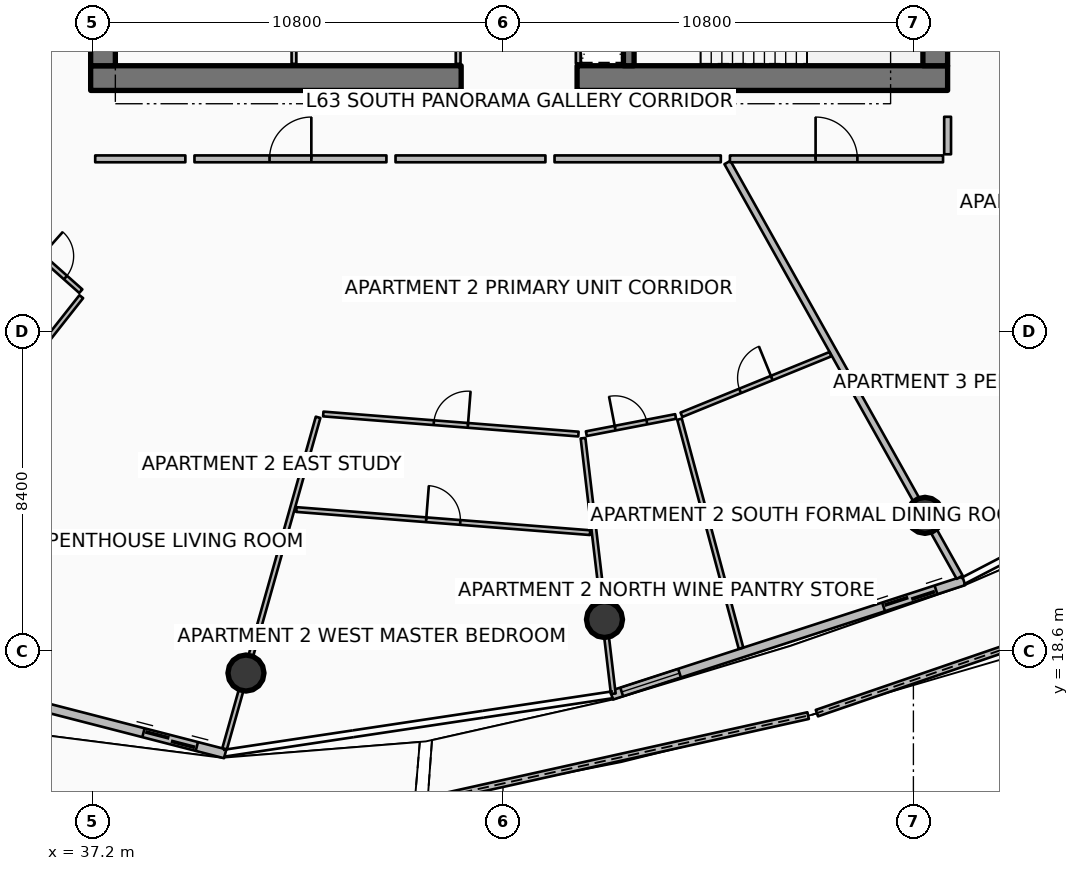
"""IFC4 building model, lengths in metres.
Left out: names, types, materials, properties, quantities, classifications, styles, units other than length and angle.
Written with IfcOpenShell. Run it as: python <this file> out.ifc"""

import sys

from ifc_helpers import new_model, si_unit, direction, frame, frame_2d, origin, origin_2d, place, context, subcontext, project, spatial, polyline, rectangle, circle, outline, extrude, element, fill, save


model = new_model("IFC4")
c1 = context("Model", 3, precision=1e-05, world=origin(), true_north=direction((0.0, 1.0)))
c2 = subcontext(c1, "Body", "Model", "MODEL_VIEW")
j1 = project(units=[si_unit("LENGTHUNIT", "METRE"), si_unit("PLANEANGLEUNIT", "RADIAN")], contexts=[c1])
p1 = place(None, origin())
s1 = spatial("IfcSite", under=j1, at=p1, CompositionType="ELEMENT")
p2 = place(p1, origin())
s2 = spatial("IfcBuilding", under=s1, at=p2, CompositionType="ELEMENT")
p3 = place(p2, frame((0.0, 0.0, 252.1)))
s3 = spatial("IfcBuildingStorey", under=s2, at=p3, CompositionType="ELEMENT", Elevation=252.1)
for number, where, z_axis, x_axis in (
    (1, (37.15, 33.675, 0.0), (0.0, 0.0, 1.0), (1.0, 0.0, 0.0)),
    (2, (49.95, 33.675, 0.0), (0.0, 0.0, 1.0), (1.0, 0.0, 0.0)),
):
    element("IfcWall", number, at=place(p3, frame(where, z_axis=z_axis, x_axis=x_axis)), inside=s3, PredefinedType="SHEAR", context=c2, shape_type="SweptSolid", body=[
        extrude(rectangle(XDim=9.75, YDim=0.65, at=frame_2d((4.875, 0.0))), origin(), (0.0, 0.0, 1.0), 3.85),
    ])
for number, where, z_axis, x_axis in (
    (3, (37.475, 34.0, 0.0), (0.0, 0.0, 1.0), (0.0, 1.0, 0.0)),
    (4, (59.375, 34.0, 0.0), (0.0, 0.0, 1.0), (0.0, 1.0, 0.0)),
):
    element("IfcWall", number, at=place(p3, frame(where, z_axis=z_axis, x_axis=x_axis)), inside=s3, PredefinedType="SHEAR", context=c2, shape_type="SweptSolid", body=[
        extrude(rectangle(XDim=16.0, YDim=0.65, at=frame_2d((8.0, 0.0))), origin(), (0.0, 0.0, 1.0), 3.85),
    ])
p4 = place(p3, frame((51.31, 34.0, 0.0), z_axis=(0.0, 0.0, 1.0), x_axis=(0.0, 1.0, 0.0)))
e5 = element("IfcWall", 5, at=p4, inside=s3, PredefinedType="SHEAR", context=c2, shape_type="SweptSolid", body=[
    extrude(rectangle(XDim=3.5, YDim=0.28, at=frame_2d((1.75, 0.0))), origin(), (0.0, 0.0, 1.0), 3.85),
])
for number, where, z_axis, x_axis in (
    (6, (41.237, 18.021, 0.0), (0.0, 0.0, 1.0), (1.0, 0.0, 0.0)),
    (7, (50.671, 19.429, 0.0), (0.0, 0.0, 1.0), (1.0, 0.0, 0.0)),
    (8, (59.105, 22.17, 0.0), (0.0, 0.0, 1.0), (1.0, 0.0, 0.0)),
):
    element("IfcColumn", number, at=place(p3, frame(where, z_axis=z_axis, x_axis=x_axis)), inside=s3, PredefinedType="COLUMN", context=c2, shape_type="SweptSolid", body=[
        extrude(circle(Radius=0.475, at=origin_2d()), origin(), (0.0, 0.0, 1.0), 3.59),
    ])
p5 = place(p3, frame((46.017, 14.673, 0.0), z_axis=(0.0, 0.0, 1.0), x_axis=(0.976130464401, 0.217184982143, 0.0)))
e9 = element("IfcWall", 9, at=p5, inside=s3, PredefinedType="PARAPET", context=c2, shape_type="SweptSolid", body=[
    extrude(outline(polyline([(0.0, 0.0), (10.258, 0.0), (10.257, 1.348), (5.129, 1.182), (0.0, 1.12), (0.0, 0.0)])), frame((0.0, 0.09, 0.0), z_axis=(0.0, -1.0, 0.0), x_axis=(1.0, 0.0, 0.0)), (0.0, 0.0, 1.0), 0.18),
])
p6 = place(p3, frame((56.26, 16.966, 0.0), z_axis=(0.0, 0.0, 1.0), x_axis=(0.945994037051, 0.32418402469, 0.0)))
e10 = element("IfcWall", 10, at=p6, inside=s3, PredefinedType="PARAPET", context=c2, shape_type="SweptSolid", body=[
    extrude(outline(polyline([(0.0, 0.0), (10.544, 0.0), (10.544, 1.747), (5.272, 1.562), (0.0, 1.348), (0.0, 0.0)])), frame((0.0, 0.09, 0.0), z_axis=(0.0, -1.0, 0.0), x_axis=(1.0, 0.0, 0.0)), (0.0, 0.0, 1.0), 0.18),
])
p7 = place(p3, frame((29.614, 18.751, 0.0), z_axis=(0.0, 0.0, 1.0), x_axis=(0.968343758421, -0.249620442927, 0.0)))
e11 = element("IfcWall", 11, at=p7, inside=s3, PredefinedType="SOLIDWALL", context=c2, shape_type="SweptSolid", body=[
    extrude(rectangle(XDim=11.438, YDim=0.24, at=frame_2d((5.719, 0.0))), origin(), (0.0, 0.0, 1.0), 2.54),
])
p8 = place(p7, frame((9.218, 0.0, 0.0)))
e12 = element("IfcOpeningElement", 12, at=p8, cuts=e11, PredefinedType="OPENING", context=c2, shape_type="SweptSolid", body=[
    extrude(rectangle(XDim=1.45, YDim=2.15, at=frame_2d((0.725, 1.075))), frame((0.0, 0.13, 0.0), z_axis=(0.0, -1.0, 0.0), x_axis=(1.0, 0.0, 0.0)), (0.0, 0.0, 1.0), 0.26),
])
p9 = place(p7, frame((0.28, 0.0, 0.65)))
e13 = element("IfcOpeningElement", 13, at=p9, cuts=e11, PredefinedType="OPENING", context=c2, shape_type="SweptSolid", body=[
    extrude(rectangle(XDim=1.6, YDim=1.5, at=frame_2d((0.8, 0.75))), frame((0.0, 0.13, 0.0), z_axis=(0.0, -1.0, 0.0), x_axis=(1.0, 0.0, 0.0)), (0.0, 0.0, 1.0), 0.26),
])
p10 = place(p3, frame((50.858, 17.436, 0.0), z_axis=(0.0, 0.0, 1.0), x_axis=(0.951055974609, 0.309018661507, 0.0)))
e14 = element("IfcWall", 14, at=p10, inside=s3, PredefinedType="SOLIDWALL", context=c2, shape_type="SweptSolid", body=[
    extrude(rectangle(XDim=9.745, YDim=0.24, at=frame_2d((4.873, 0.0))), origin(), (0.0, 0.0, 1.0), 2.54),
])
p11 = place(p10, frame((7.525, 0.0, 0.0)))
e15 = element("IfcOpeningElement", 15, at=p11, cuts=e14, PredefinedType="OPENING", context=c2, shape_type="SweptSolid", body=[
    extrude(rectangle(XDim=1.45, YDim=2.15, at=frame_2d((0.725, 1.075))), frame((0.0, 0.13, 0.0), z_axis=(0.0, -1.0, 0.0), x_axis=(1.0, 0.0, 0.0)), (0.0, 0.0, 1.0), 0.26),
])
p12 = place(p10, frame((0.28, 0.0, 0.65)))
e16 = element("IfcOpeningElement", 16, at=p12, cuts=e14, PredefinedType="OPENING", context=c2, shape_type="SweptSolid", body=[
    extrude(rectangle(XDim=1.6, YDim=1.5, at=frame_2d((0.8, 0.75))), frame((0.0, 0.13, 0.0), z_axis=(0.0, -1.0, 0.0), x_axis=(1.0, 0.0, 0.0)), (0.0, 0.0, 1.0), 0.26),
])
for number, where, z_axis, x_axis in (
    (17, (46.82, 34.05, 0.0), (0.0, 0.0, 1.0), (0.0, 1.0, 0.0)),
    (18, (42.5, 34.05, 0.0), (0.0, 0.0, 1.0), (0.0, 1.0, 0.0)),
):
    element("IfcWall", number, at=place(p3, frame(where, z_axis=z_axis, x_axis=x_axis)), inside=s3, PredefinedType="PARTITIONING", context=c2, shape_type="SweptSolid", body=[
        extrude(rectangle(XDim=2.03, YDim=0.125, at=frame_2d((1.015, 0.0))), origin(), (0.0, 0.0, 1.0), 3.03),
    ])
p13 = place(p3, frame((49.98, 34.06, 0.0), z_axis=(0.0, 0.0, 1.0), x_axis=(0.0, 1.0, 0.0)))
e19 = element("IfcWall", 19, at=p13, inside=s3, PredefinedType="PARTITIONING", context=c2, shape_type="SweptSolid", body=[
    extrude(rectangle(XDim=3.4, YDim=0.125, at=frame_2d((1.7, 0.0))), origin(), (0.0, 0.0, 1.0), 3.03),
])
p14 = place(p3, frame((37.054, 35.87, 0.0), z_axis=(0.0, 0.0, 1.0), x_axis=(-0.872490186067, -0.488631635506, 0.0)))
e20 = element("IfcWall", 20, at=p14, inside=s3, PredefinedType="PARTITIONING", context=c2, shape_type="SweptSolid", body=[
    extrude(rectangle(XDim=17.884, YDim=0.18, at=frame_2d((8.942, 0.0))), origin(), (0.0, 0.0, 1.0), 2.957),
])
p15 = place(p3, frame((53.906, 31.454, 0.0), z_axis=(0.0, 0.0, 1.0), x_axis=(0.48862654941, -0.872493034477, 0.0)))
e21 = element("IfcWall", 21, at=p15, inside=s3, PredefinedType="PARTITIONING", context=c2, shape_type="SweptSolid", body=[
    extrude(rectangle(XDim=12.508, YDim=0.18, at=frame_2d((6.254, 0.0))), origin(), (0.0, 0.0, 1.0), 2.957),
])
p16 = place(p3, frame((39.882, 31.55, 0.0), z_axis=(0.0, 0.0, 1.0), x_axis=(1.0, 0.0, 0.0)))
e22 = element("IfcWall", 22, at=p16, inside=s3, PredefinedType="PARTITIONING", context=c2, shape_type="SweptSolid", body=[
    extrude(rectangle(XDim=5.051, YDim=0.18, at=frame_2d((2.525, 0.0))), origin(), (0.0, 0.0, 1.0), 2.957),
])
p17 = place(p16, frame((1.975, 0.0, 0.0)))
e23 = element("IfcOpeningElement", 23, at=p17, cuts=e22, PredefinedType="OPENING", context=c2, shape_type="SweptSolid", body=[
    extrude(rectangle(XDim=1.1, YDim=2.1, at=frame_2d((0.55, 1.05))), frame((0.0, 0.1, 0.0), z_axis=(0.0, -1.0, 0.0), x_axis=(1.0, 0.0, 0.0)), (0.0, 0.0, 1.0), 0.2),
])
p18 = place(p3, frame((37.27, 31.55, 0.0), z_axis=(0.0, 0.0, 1.0), x_axis=(1.0, 0.0, 0.0)))
e24 = element("IfcWall", 24, at=p18, inside=s3, PredefinedType="PARTITIONING", context=c2, shape_type="SweptSolid", body=[
    extrude(rectangle(XDim=2.372, YDim=0.18, at=frame_2d((1.186, 0.0))), origin(), (0.0, 0.0, 1.0), 2.957),
])
p19 = place(p3, frame((36.903, 27.924, 0.0), z_axis=(0.0, 0.0, 1.0), x_axis=(-0.619090039254, -0.785320013304, 0.0)))
e25 = element("IfcWall", 25, at=p19, inside=s3, PredefinedType="PARTITIONING", context=c2, shape_type="SweptSolid", body=[
    extrude(rectangle(XDim=11.672, YDim=0.125, at=frame_2d((5.836, 0.0))), origin(), (0.0, 0.0, 1.0), 2.957),
])
p20 = place(p3, frame((35.45, 29.35, 0.0), z_axis=(0.0, 0.0, 1.0), x_axis=(0.747360411924, -0.664418854857, 0.0)))
e26 = element("IfcWall", 26, at=p20, inside=s3, PredefinedType="PARTITIONING", context=c2, shape_type="SweptSolid", body=[
    extrude(rectangle(XDim=1.928, YDim=0.125, at=frame_2d((0.964, 0.0))), origin(), (0.0, 0.0, 1.0), 2.957),
])
p21 = place(p20, frame((0.539, 0.0, 0.0)))
e27 = element("IfcOpeningElement", 27, at=p21, cuts=e26, PredefinedType="OPENING", context=c2, shape_type="SweptSolid", body=[
    extrude(rectangle(XDim=0.85, YDim=2.06, at=frame_2d((0.425, 1.03))), frame((0.0, 0.073, 0.0), z_axis=(0.0, -1.0, 0.0), x_axis=(1.0, 0.0, 0.0)), (0.0, 0.0, 1.0), 0.145),
])
p22 = place(p3, frame((45.173, 31.55, 0.0), z_axis=(0.0, 0.0, 1.0), x_axis=(1.0, 0.0, 0.0)))
e28 = element("IfcWall", 28, at=p22, inside=s3, PredefinedType="PARTITIONING", context=c2, shape_type="SweptSolid", body=[
    extrude(rectangle(XDim=3.944, YDim=0.18, at=frame_2d((1.972, 0.0))), origin(), (0.0, 0.0, 1.0), 2.957),
])
p23 = place(p3, frame((43.135, 24.749, 0.0), z_axis=(0.0, 0.0, 1.0), x_axis=(-0.271445445258, -0.962453827593, 0.0)))
e29 = element("IfcWall", 29, at=p23, inside=s3, PredefinedType="PARTITIONING", context=c2, shape_type="SweptSolid", body=[
    extrude(rectangle(XDim=9.061, YDim=0.125, at=frame_2d((4.53, 0.0))), origin(), (0.0, 0.0, 1.0), 2.957),
])
p24 = place(p3, frame((43.271, 24.837, 0.0), z_axis=(0.0, 0.0, 1.0), x_axis=(0.996915339886, -0.078484425849, 0.0)))
e30 = element("IfcWall", 30, at=p24, inside=s3, PredefinedType="PARTITIONING", context=c2, shape_type="SweptSolid", body=[
    extrude(rectangle(XDim=6.735, YDim=0.125, at=frame_2d((3.367, 0.0))), origin(), (0.0, 0.0, 1.0), 2.957),
])
p25 = place(p24, frame((2.917, 0.0, 0.0)))
e31 = element("IfcOpeningElement", 31, at=p25, cuts=e30, PredefinedType="OPENING", context=c2, shape_type="SweptSolid", body=[
    extrude(rectangle(XDim=0.9, YDim=2.08, at=frame_2d((0.45, 1.04))), frame((0.0, 0.073, 0.0), z_axis=(0.0, -1.0, 0.0), x_axis=(1.0, 0.0, 0.0)), (0.0, 0.0, 1.0), 0.145),
])
p26 = place(p3, frame((42.562, 22.323, 0.0), z_axis=(0.0, 0.0, 1.0), x_axis=(0.996916778928, -0.078466144881, 0.0)))
e32 = element("IfcWall", 32, at=p26, inside=s3, PredefinedType="PARTITIONING", context=c2, shape_type="SweptSolid", body=[
    extrude(rectangle(XDim=7.754, YDim=0.125, at=frame_2d((3.877, 0.0))), origin(), (0.0, 0.0, 1.0), 2.957),
])
p27 = place(p26, frame((3.427, 0.0, 0.0)))
e33 = element("IfcOpeningElement", 33, at=p27, cuts=e32, PredefinedType="OPENING", context=c2, shape_type="SweptSolid", body=[
    extrude(rectangle(XDim=0.9, YDim=2.08, at=frame_2d((0.45, 1.04))), frame((0.0, 0.073, 0.0), z_axis=(0.0, -1.0, 0.0), x_axis=(1.0, 0.0, 0.0)), (0.0, 0.0, 1.0), 0.145),
])
p28 = place(p3, frame((49.357, 31.55, 0.0), z_axis=(0.0, 0.0, 1.0), x_axis=(1.0, 0.0, 0.0)))
e34 = element("IfcWall", 34, at=p28, inside=s3, PredefinedType="PARTITIONING", context=c2, shape_type="SweptSolid", body=[
    extrude(rectangle(XDim=4.376, YDim=0.18, at=frame_2d((2.188, 0.0))), origin(), (0.0, 0.0, 1.0), 2.957),
])
p29 = place(p3, frame((50.107, 24.2, 0.0), z_axis=(0.0, 0.0, 1.0), x_axis=(0.117552553428, -0.99306666301, 0.0)))
e35 = element("IfcWall", 35, at=p29, inside=s3, PredefinedType="PARTITIONING", context=c2, shape_type="SweptSolid", body=[
    extrude(rectangle(XDim=6.771, YDim=0.125, at=frame_2d((3.385, 0.0))), origin(), (0.0, 0.0, 1.0), 2.957),
])
p30 = place(p3, frame((52.646, 24.699, 0.0), z_axis=(0.0, 0.0, 1.0), x_axis=(0.259313772229, -0.965793128746, 0.0)))
e36 = element("IfcWall", 36, at=p30, inside=s3, PredefinedType="PARTITIONING", context=c2, shape_type="SweptSolid", body=[
    extrude(rectangle(XDim=6.238, YDim=0.125, at=frame_2d((3.119, 0.0))), origin(), (0.0, 0.0, 1.0), 3.03),
])
p31 = place(p3, frame((50.193, 24.318, 0.0), z_axis=(0.0, 0.0, 1.0), x_axis=(0.981978792413, 0.188991140667, 0.0)))
e37 = element("IfcWall", 37, at=p31, inside=s3, PredefinedType="PARTITIONING", context=c2, shape_type="SweptSolid", body=[
    extrude(rectangle(XDim=2.394, YDim=0.125, at=frame_2d((1.197, 0.0))), origin(), (0.0, 0.0, 1.0), 2.957),
])
p32 = place(p31, frame((0.772, 0.0, 0.0)))
e38 = element("IfcOpeningElement", 38, at=p32, cuts=e37, PredefinedType="OPENING", context=c2, shape_type="SweptSolid", body=[
    extrude(rectangle(XDim=0.85, YDim=2.06, at=frame_2d((0.425, 1.03))), frame((0.0, 0.073, 0.0), z_axis=(0.0, -1.0, 0.0), x_axis=(1.0, 0.0, 0.0)), (0.0, 0.0, 1.0), 0.145),
])
p33 = place(p3, frame((52.696, 24.816, 0.0), z_axis=(0.0, 0.0, 1.0), x_axis=(0.926276631798, 0.376844266754, 0.0)))
e39 = element("IfcWall", 39, at=p33, inside=s3, PredefinedType="PARTITIONING", context=c2, shape_type="SweptSolid", body=[
    extrude(rectangle(XDim=4.232, YDim=0.125, at=frame_2d((2.116, 0.0))), origin(), (0.0, 0.0, 1.0), 2.957),
])
p34 = place(p33, frame((1.666, 0.0, 0.0)))
e40 = element("IfcOpeningElement", 40, at=p34, cuts=e39, PredefinedType="OPENING", context=c2, shape_type="SweptSolid", body=[
    extrude(rectangle(XDim=0.9, YDim=2.08, at=frame_2d((0.45, 1.04))), frame((0.0, 0.073, 0.0), z_axis=(0.0, -1.0, 0.0), x_axis=(1.0, 0.0, 0.0)), (0.0, 0.0, 1.0), 0.145),
])
p35 = place(p3, frame((53.972, 31.55, 0.0), z_axis=(0.0, 0.0, 1.0), x_axis=(1.0, 0.0, 0.0)))
e41 = element("IfcWall", 41, at=p35, inside=s3, PredefinedType="PARTITIONING", context=c2, shape_type="SweptSolid", body=[
    extrude(rectangle(XDim=5.608, YDim=0.18, at=frame_2d((2.804, 0.0))), origin(), (0.0, 0.0, 1.0), 2.957),
])
p36 = place(p35, frame((2.254, 0.0, 0.0)))
e42 = element("IfcOpeningElement", 42, at=p36, cuts=e41, PredefinedType="OPENING", context=c2, shape_type="SweptSolid", body=[
    extrude(rectangle(XDim=1.1, YDim=2.1, at=frame_2d((0.55, 1.05))), frame((0.0, 0.1, 0.0), z_axis=(0.0, -1.0, 0.0), x_axis=(1.0, 0.0, 0.0)), (0.0, 0.0, 1.0), 0.2),
])
p37 = place(p3, frame((59.7, 31.67, 0.0), z_axis=(0.0, 0.0, 1.0), x_axis=(0.0, 1.0, 0.0)))
e43 = element("IfcWall", 43, at=p37, inside=s3, PredefinedType="PARTITIONING", context=c2, shape_type="SweptSolid", body=[
    extrude(rectangle(XDim=0.987, YDim=0.18, at=frame_2d((0.493, 0.0))), origin(), (0.0, 0.0, 1.0), 2.957),
])
p38 = place(p8, origin())
e44 = element("IfcDoor", 44, at=p38, inside=s3, OperationType="DOUBLE_DOOR_SLIDING", PredefinedType="DOOR", context=c2, shape_type="SweptSolid", body=[
    extrude(rectangle(XDim=1.45, YDim=2.15, at=frame_2d((0.725, 1.075))), frame((0.0, 0.025, 0.0), z_axis=(0.0, -1.0, 0.0), x_axis=(1.0, 0.0, 0.0)), (0.0, 0.0, 1.0), 0.05),
])
fill(e12, e44)
p39 = place(p11, origin())
e45 = element("IfcDoor", 45, at=p39, inside=s3, OperationType="DOUBLE_DOOR_SLIDING", PredefinedType="DOOR", context=c2, shape_type="SweptSolid", body=[
    extrude(rectangle(XDim=1.45, YDim=2.15, at=frame_2d((0.725, 1.075))), frame((0.0, 0.025, 0.0), z_axis=(0.0, -1.0, 0.0), x_axis=(1.0, 0.0, 0.0)), (0.0, 0.0, 1.0), 0.05),
])
fill(e15, e45)
p40 = place(p12, origin())
e46 = element("IfcWindow", 46, at=p40, inside=s3, PartitioningType="SINGLE_PANEL", PredefinedType="WINDOW", context=c2, shape_type="SweptSolid", body=[
    extrude(rectangle(XDim=1.6, YDim=1.5, at=frame_2d((0.8, 0.75))), frame((0.0, 0.03, 0.0), z_axis=(0.0, -1.0, 0.0), x_axis=(1.0, 0.0, 0.0)), (0.0, 0.0, 1.0), 0.06),
])
fill(e16, e46)
p41 = place(p17, origin())
e47 = element("IfcDoor", 47, at=p41, inside=s3, OperationType="SINGLE_SWING_RIGHT", PredefinedType="DOOR", context=c2, shape_type="SweptSolid", body=[
    extrude(rectangle(XDim=1.1, YDim=2.1, at=frame_2d((0.55, 1.05))), frame((0.0, 0.025, 0.0), z_axis=(0.0, -1.0, 0.0), x_axis=(1.0, 0.0, 0.0)), (0.0, 0.0, 1.0), 0.05),
])
fill(e23, e47)
p42 = place(p21, origin())
e48 = element("IfcDoor", 48, at=p42, inside=s3, OperationType="SINGLE_SWING_LEFT", PredefinedType="DOOR", context=c2, shape_type="SweptSolid", body=[
    extrude(rectangle(XDim=0.85, YDim=2.06, at=frame_2d((0.425, 1.03))), frame((0.0, 0.025, 0.0), z_axis=(0.0, -1.0, 0.0), x_axis=(1.0, 0.0, 0.0)), (0.0, 0.0, 1.0), 0.05),
])
fill(e27, e48)
p43 = place(p25, origin())
e49 = element("IfcDoor", 49, at=p43, inside=s3, OperationType="SINGLE_SWING_RIGHT", PredefinedType="DOOR", context=c2, shape_type="SweptSolid", body=[
    extrude(rectangle(XDim=0.9, YDim=2.08, at=frame_2d((0.45, 1.04))), frame((0.0, 0.025, 0.0), z_axis=(0.0, -1.0, 0.0), x_axis=(1.0, 0.0, 0.0)), (0.0, 0.0, 1.0), 0.05),
])
fill(e31, e49)
p44 = place(p27, origin())
e50 = element("IfcDoor", 50, at=p44, inside=s3, OperationType="SINGLE_SWING_LEFT", PredefinedType="DOOR", context=c2, shape_type="SweptSolid", body=[
    extrude(rectangle(XDim=0.9, YDim=2.08, at=frame_2d((0.45, 1.04))), frame((0.0, 0.025, 0.0), z_axis=(0.0, -1.0, 0.0), x_axis=(1.0, 0.0, 0.0)), (0.0, 0.0, 1.0), 0.05),
])
fill(e33, e50)
p45 = place(p32, origin())
e51 = element("IfcDoor", 51, at=p45, inside=s3, OperationType="SINGLE_SWING_LEFT", PredefinedType="DOOR", context=c2, shape_type="SweptSolid", body=[
    extrude(rectangle(XDim=0.85, YDim=2.06, at=frame_2d((0.425, 1.03))), frame((0.0, 0.025, 0.0), z_axis=(0.0, -1.0, 0.0), x_axis=(1.0, 0.0, 0.0)), (0.0, 0.0, 1.0), 0.05),
])
fill(e38, e51)
p46 = place(p34, origin())
e52 = element("IfcDoor", 52, at=p46, inside=s3, OperationType="SINGLE_SWING_RIGHT", PredefinedType="DOOR", context=c2, shape_type="SweptSolid", body=[
    extrude(rectangle(XDim=0.9, YDim=2.08, at=frame_2d((0.45, 1.04))), frame((0.0, 0.025, 0.0), z_axis=(0.0, -1.0, 0.0), x_axis=(1.0, 0.0, 0.0)), (0.0, 0.0, 1.0), 0.05),
])
fill(e40, e52)
p47 = place(p36, origin())
e53 = element("IfcDoor", 53, at=p47, inside=s3, OperationType="SINGLE_SWING_LEFT", PredefinedType="DOOR", context=c2, shape_type="SweptSolid", body=[
    extrude(rectangle(XDim=1.1, YDim=2.1, at=frame_2d((0.55, 1.05))), frame((0.0, 0.025, 0.0), z_axis=(0.0, -1.0, 0.0), x_axis=(1.0, 0.0, 0.0)), (0.0, 0.0, 1.0), 0.05),
])
fill(e42, e53)
save(model, sys.argv[1])
